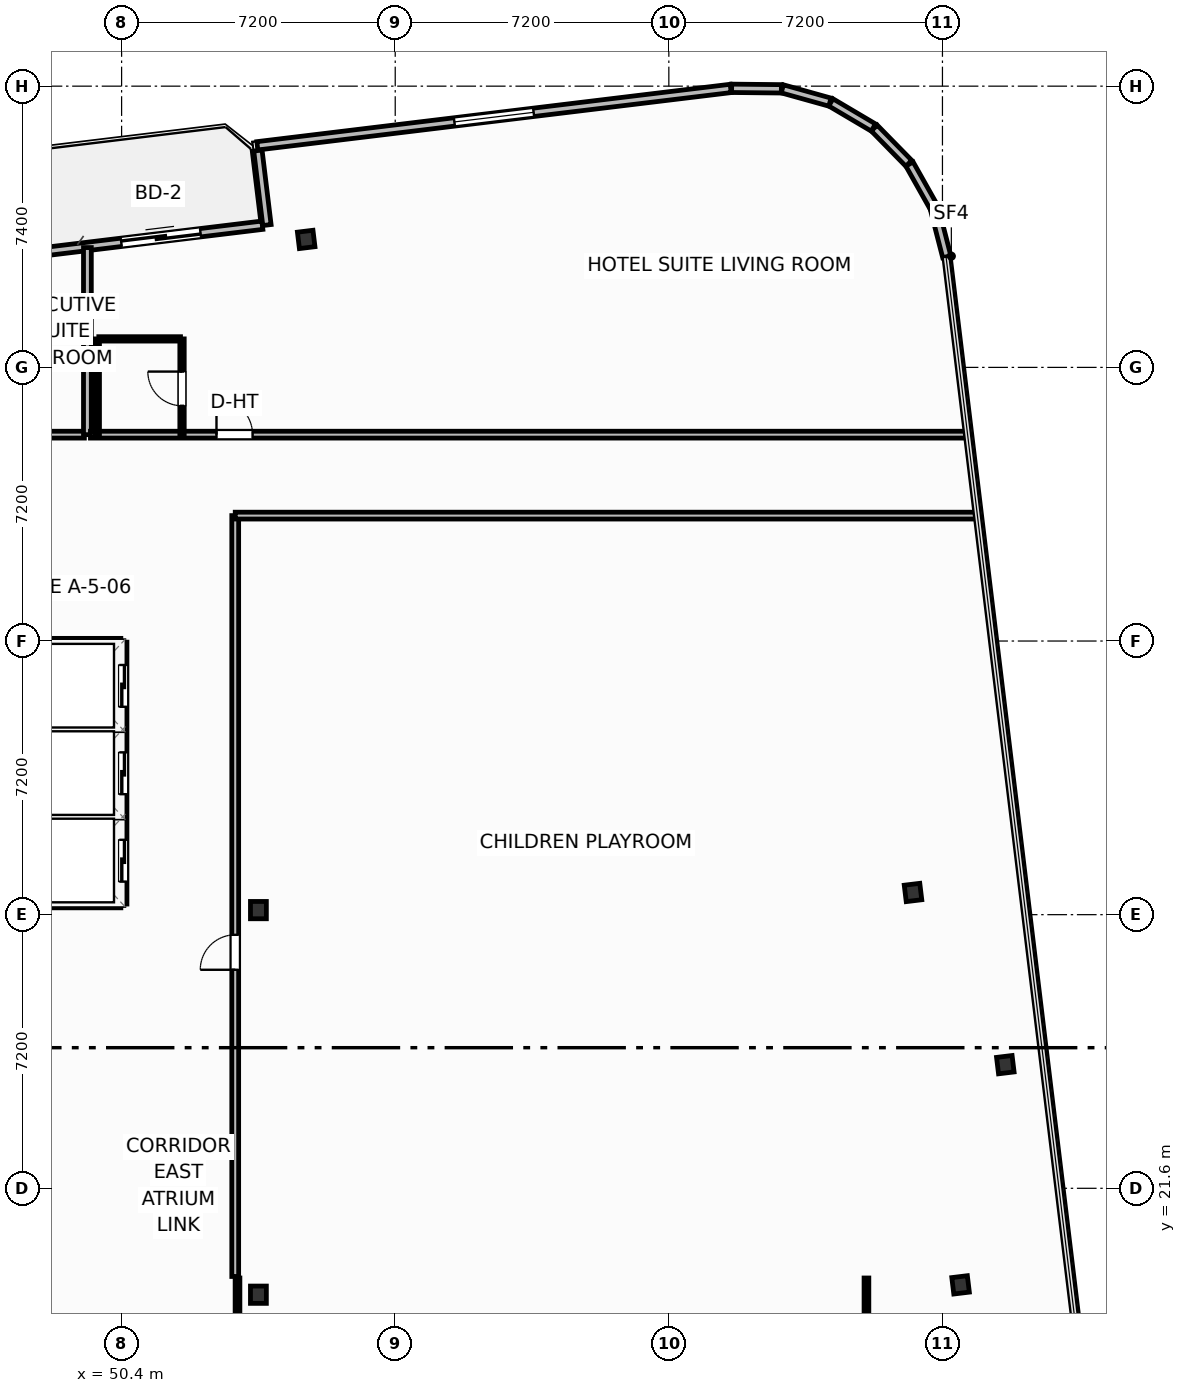
"""IFC4 building model, lengths in metres.
Left out: names, types, materials, properties, quantities, classifications, styles, units other than length and angle.
Written with IfcOpenShell. Run it as: python <this file> out.ifc"""

import sys

from ifc_helpers import new_model, si_unit, direction, frame, frame_2d, origin, origin_2d, place, context, subcontext, project, spatial, rectangle, i_section, extrude, element, fill, save


model = new_model("IFC4")
c1 = context("Model", 3, precision=1e-05, world=origin(), true_north=direction((0.0, 1.0)))
c2 = subcontext(c1, "Body", "Model", "MODEL_VIEW")
j1 = project(units=[si_unit("LENGTHUNIT", "METRE"), si_unit("PLANEANGLEUNIT", "RADIAN")], contexts=[c1])
p1 = place(None, origin())
s1 = spatial("IfcSite", under=j1, at=p1, CompositionType="ELEMENT")
p2 = place(p1, origin())
s2 = spatial("IfcBuilding", under=s1, at=p2, CompositionType="ELEMENT")
p3 = place(p2, frame((0.0, 0.0, 178.3)))
s3 = spatial("IfcBuildingStorey", under=s2, at=p3, CompositionType="ELEMENT", Elevation=178.3)
for number, where, z_axis, x_axis in (
    (1, (54.0, 18.8, 0.0), (0.0, 0.0, 1.0), (1.0, 0.0, 0.0)),
    (2, (54.0, 28.92, 0.0), (0.0, 0.0, 1.0), (1.0, 0.0, 0.0)),
):
    element("IfcColumn", number, at=place(p3, frame(where, z_axis=z_axis, x_axis=x_axis)), inside=s3, PredefinedType="COLUMN", context=c2, shape_type="SweptSolid", body=[
        extrude(i_section(OverallWidth=0.418, OverallDepth=0.455, WebThickness=0.042, FlangeThickness=0.068, FilletRadius=0.025, at=origin_2d()), origin(), (0.0, 0.0, 1.0), 3.7),
    ])
for number, where, z_axis, x_axis in (
    (3, (72.477, 19.059, 0.0), (0.0, 0.0, 1.0), (0.993, 0.12, 0.0)),
    (4, (73.654, 24.853, 0.0), (0.0, 0.0, 1.0), (0.993, 0.12, 0.0)),
    (5, (71.225, 29.384, 0.0), (0.0, 0.0, 1.0), (0.993, 0.12, 0.0)),
    (6, (55.257, 46.567, 0.0), (0.0, 0.0, 1.0), (0.993, 0.12, 0.0)),
):
    element("IfcColumn", number, at=place(p3, frame(where, z_axis=z_axis, x_axis=x_axis)), inside=s3, PredefinedType="COLUMN", context=c2, shape_type="SweptSolid", body=[
        extrude(i_section(OverallWidth=0.412, OverallDepth=0.435, WebThickness=0.036, FlangeThickness=0.057, FilletRadius=0.025, at=origin_2d()), origin(), (0.0, 0.0, 1.0), 3.7),
    ])
p4 = place(p3, frame((48.148, 46.219, 0.0), z_axis=(0.0, 0.0, 1.0), x_axis=(0.992729951822, 0.120362962556, 0.0)))
e7 = element("IfcWall", 7, at=p4, inside=s3, PredefinedType="SOLIDWALL", context=c2, shape_type="SweptSolid", body=[
    extrude(rectangle(XDim=6.0, YDim=0.22, at=frame_2d((3.0, 0.0))), origin(), (0.0, 0.0, 1.0), 2.73),
])
p5 = place(p4, frame((2.26, 0.0, 0.0)))
e8 = element("IfcOpeningElement", 8, at=p5, cuts=e7, PredefinedType="OPENING", context=c2, shape_type="SweptSolid", body=[
    extrude(rectangle(XDim=2.1, YDim=2.3, at=frame_2d((1.05, 1.15))), frame((0.0, 0.12, 0.0), z_axis=(0.0, -1.0, 0.0), x_axis=(1.0, 0.0, 0.0)), (0.0, 0.0, 1.0), 0.24),
])
p6 = place(p3, frame((72.114, 46.112, 0.0), z_axis=(0.0, 0.0, 1.0), x_axis=(-0.248942347653, 0.968518305219, 0.0)))
e9 = element("IfcWall", 9, at=p6, inside=s3, PredefinedType="SOLIDWALL", context=c2, shape_type="SweptSolid", body=[
    extrude(rectangle(XDim=1.326, YDim=0.22, at=frame_2d((0.663, 0.0))), origin(), (0.0, 0.0, 1.0), 2.73),
])
p7 = place(p3, frame((71.771, 47.418, 0.0), z_axis=(0.0, 0.0, 1.0), x_axis=(-0.491098509465, 0.871104043155, 0.0)))
e10 = element("IfcWall", 10, at=p7, inside=s3, PredefinedType="SOLIDWALL", context=c2, shape_type="SweptSolid", body=[
    extrude(rectangle(XDim=1.301, YDim=0.22, at=frame_2d((0.65, 0.0))), origin(), (0.0, 0.0, 1.0), 2.73),
])
p8 = place(p3, frame((71.115, 48.569, 0.0), z_axis=(0.0, 0.0, 1.0), x_axis=(-0.699844331926, 0.714295394827, 0.0)))
e11 = element("IfcWall", 11, at=p8, inside=s3, PredefinedType="SOLIDWALL", context=c2, shape_type="SweptSolid", body=[
    extrude(rectangle(XDim=1.301, YDim=0.22, at=frame_2d((0.65, 0.0))), origin(), (0.0, 0.0, 1.0), 2.73),
])
p9 = place(p3, frame((70.183, 49.511, 0.0), z_axis=(0.0, 0.0, 1.0), x_axis=(-0.860933999601, 0.508716668029, 0.0)))
e12 = element("IfcWall", 12, at=p9, inside=s3, PredefinedType="SOLIDWALL", context=c2, shape_type="SweptSolid", body=[
    extrude(rectangle(XDim=1.301, YDim=0.22, at=frame_2d((0.65, 0.0))), origin(), (0.0, 0.0, 1.0), 2.73),
])
p10 = place(p3, frame((69.039, 50.18, 0.0), z_axis=(0.0, 0.0, 1.0), x_axis=(-0.963205341366, 0.26876657226, 0.0)))
e13 = element("IfcWall", 13, at=p10, inside=s3, PredefinedType="SOLIDWALL", context=c2, shape_type="SweptSolid", body=[
    extrude(rectangle(XDim=1.301, YDim=0.22, at=frame_2d((0.65, 0.0))), origin(), (0.0, 0.0, 1.0), 2.73),
])
p11 = place(p3, frame((67.761, 50.53, 0.0), z_axis=(0.0, 0.0, 1.0), x_axis=(-0.999947358106, 0.010260653861, 0.0)))
e14 = element("IfcWall", 14, at=p11, inside=s3, PredefinedType="SOLIDWALL", context=c2, shape_type="SweptSolid", body=[
    extrude(rectangle(XDim=1.309, YDim=0.22, at=frame_2d((0.654, 0.0))), origin(), (0.0, 0.0, 1.0), 2.73),
])
p12 = place(p3, frame((66.427, 50.54, 0.0), z_axis=(0.0, 0.0, 1.0), x_axis=(-0.992731739233, -0.120348219431, 0.0)))
e15 = element("IfcWall", 15, at=p12, inside=s3, PredefinedType="SOLIDWALL", context=c2, shape_type="SweptSolid", body=[
    extrude(rectangle(XDim=12.547, YDim=0.22, at=frame_2d((6.273, 0.0))), origin(), (0.0, 0.0, 1.0), 2.73),
])
p13 = place(p12, frame((5.224, 0.0, 0.8)))
e16 = element("IfcOpeningElement", 16, at=p13, cuts=e15, PredefinedType="OPENING", context=c2, shape_type="SweptSolid", body=[
    extrude(rectangle(XDim=2.1, YDim=1.75, at=frame_2d((1.05, 0.875))), frame((0.0, 0.12, 0.0), z_axis=(0.0, -1.0, 0.0), x_axis=(1.0, 0.0, 0.0)), (0.0, 0.0, 1.0), 0.24),
])
p14 = place(p3, frame((53.987, 48.906, 0.0), z_axis=(0.0, 0.0, 1.0), x_axis=(0.120397815541, -0.992725725472, 0.0)))
e17 = element("IfcWall", 17, at=p14, inside=s3, PredefinedType="SOLIDWALL", context=c2, shape_type="SweptSolid", body=[
    extrude(rectangle(XDim=1.975, YDim=0.22, at=frame_2d((0.988, 0.0))), origin(), (0.0, 0.0, 1.0), 2.73),
])
p15 = place(p3, frame((53.45, 16.61, 0.0), z_axis=(0.0, 0.0, 1.0), x_axis=(0.0, 1.0, 0.0)))
e18 = element("IfcWall", 18, at=p15, inside=s3, PredefinedType="PARTITIONING", context=c2, shape_type="SweptSolid", body=[
    extrude(rectangle(XDim=2.63, YDim=0.125, at=frame_2d((1.315, 0.0))), origin(), (0.0, 0.0, 1.0), 2.662),
])
p16 = place(p3, frame((70.0, 16.61, 0.0), z_axis=(0.0, 0.0, 1.0), x_axis=(0.0, 1.0, 0.0)))
e19 = element("IfcWall", 19, at=p16, inside=s3, PredefinedType="PARTITIONING", context=c2, shape_type="SweptSolid", body=[
    extrude(rectangle(XDim=2.63, YDim=0.125, at=frame_2d((1.315, 0.0))), origin(), (0.0, 0.0, 1.0), 3.45),
])
p17 = place(p3, frame((40.58, 41.43, 0.0), z_axis=(0.0, 0.0, 1.0), x_axis=(1.0, 0.0, 0.0)))
e20 = element("IfcWall", 20, at=p17, inside=s3, PredefinedType="PARTITIONING", context=c2, shape_type="SweptSolid", body=[
    extrude(rectangle(XDim=8.84, YDim=0.18, at=frame_2d((4.42, 0.0))), origin(), (0.0, 0.0, 1.0), 3.45),
])
p18 = place(p17, frame((3.23, 0.0, 0.0)))
e21 = element("IfcOpeningElement", 21, at=p18, cuts=e20, PredefinedType="OPENING", context=c2, shape_type="SweptSolid", body=[
    extrude(rectangle(XDim=0.95, YDim=2.15, at=frame_2d((0.475, 1.075))), frame((0.0, 0.1, 0.0), z_axis=(0.0, -1.0, 0.0), x_axis=(1.0, 0.0, 0.0)), (0.0, 0.0, 1.0), 0.2),
])
p19 = place(p3, frame((49.5, 41.43, 0.0), z_axis=(0.0, 0.0, 1.0), x_axis=(0.0, 1.0, 0.0)))
e22 = element("IfcWall", 22, at=p19, inside=s3, PredefinedType="PARTITIONING", context=c2, shape_type="SweptSolid", body=[
    extrude(rectangle(XDim=4.923, YDim=0.205, at=frame_2d((2.461, 0.0))), origin(), (0.0, 0.0, 1.0), 3.45),
])
p20 = place(p3, frame((49.58, 41.43, 0.0), z_axis=(0.0, 0.0, 1.0), x_axis=(1.0, 0.0, 0.0)))
e23 = element("IfcWall", 23, at=p20, inside=s3, PredefinedType="PARTITIONING", context=c2, shape_type="SweptSolid", body=[
    extrude(rectangle(XDim=23.042, YDim=0.18, at=frame_2d((11.521, 0.0))), origin(), (0.0, 0.0, 1.0), 3.45),
])
p21 = place(p20, frame((3.317, 0.0, 0.0)))
e24 = element("IfcOpeningElement", 24, at=p21, cuts=e23, PredefinedType="OPENING", context=c2, shape_type="SweptSolid", body=[
    extrude(rectangle(XDim=0.95, YDim=2.15, at=frame_2d((0.475, 1.075))), frame((0.0, 0.1, 0.0), z_axis=(0.0, -1.0, 0.0), x_axis=(1.0, 0.0, 0.0)), (0.0, 0.0, 1.0), 0.2),
])
p22 = place(p3, frame((49.8, 43.95, 0.0), z_axis=(0.0, 0.0, 1.0), x_axis=(1.0, 0.0, 0.0)))
e25 = element("IfcWall", 25, at=p22, inside=s3, PredefinedType="PARTITIONING", context=c2, shape_type="SweptSolid", body=[
    extrude(rectangle(XDim=2.15, YDim=0.115, at=frame_2d((1.075, 0.0))), origin(), (0.0, 0.0, 1.0), 3.45),
])
p23 = place(p3, frame((51.99, 41.43, 0.0), z_axis=(0.0, 0.0, 1.0), x_axis=(0.0, 1.0, 0.0)))
e26 = element("IfcWall", 26, at=p23, inside=s3, PredefinedType="PARTITIONING", context=c2, shape_type="SweptSolid", body=[
    extrude(rectangle(XDim=2.52, YDim=0.115, at=frame_2d((1.26, 0.0))), origin(), (0.0, 0.0, 1.0), 3.45),
])
p24 = place(p23, frame((0.76, 0.0, 0.0)))
e27 = element("IfcOpeningElement", 27, at=p24, cuts=e26, PredefinedType="OPENING", context=c2, shape_type="SweptSolid", body=[
    extrude(rectangle(XDim=0.9, YDim=2.05, at=frame_2d((0.45, 1.025))), frame((0.0, 0.067, 0.0), z_axis=(0.0, -1.0, 0.0), x_axis=(1.0, 0.0, 0.0)), (0.0, 0.0, 1.0), 0.135),
])
p25 = place(p3, frame((49.76, 41.43, 0.0), z_axis=(0.0, 0.0, 1.0), x_axis=(0.0, 1.0, 0.0)))
e28 = element("IfcWall", 28, at=p25, inside=s3, PredefinedType="PARTITIONING", context=c2, shape_type="SweptSolid", body=[
    extrude(rectangle(XDim=2.52, YDim=0.115, at=frame_2d((1.26, 0.0))), origin(), (0.0, 0.0, 1.0), 3.45),
])
p26 = place(p3, frame((53.39, 19.28, 0.0), z_axis=(0.0, 0.0, 1.0), x_axis=(0.0, 1.0, 0.0)))
e29 = element("IfcWall", 29, at=p26, inside=s3, PredefinedType="PARTITIONING", context=c2, shape_type="SweptSolid", body=[
    extrude(rectangle(XDim=20.02, YDim=0.18, at=frame_2d((10.01, 0.0))), origin(), (0.0, 0.0, 1.0), 3.45),
])
p27 = place(p26, frame((8.07, 0.0, 0.0)))
e30 = element("IfcOpeningElement", 30, at=p27, cuts=e29, PredefinedType="OPENING", context=c2, shape_type="SweptSolid", body=[
    extrude(rectangle(XDim=0.92, YDim=2.05, at=frame_2d((0.46, 1.025))), frame((0.0, 0.1, 0.0), z_axis=(0.0, -1.0, 0.0), x_axis=(1.0, 0.0, 0.0)), (0.0, 0.0, 1.0), 0.2),
])
p28 = place(p3, frame((53.39, 39.3, 0.0), z_axis=(0.0, 0.0, 1.0), x_axis=(1.0, 0.0, 0.0)))
e31 = element("IfcWall", 31, at=p28, inside=s3, PredefinedType="PARTITIONING", context=c2, shape_type="SweptSolid", body=[
    extrude(rectangle(XDim=19.49, YDim=0.18, at=frame_2d((9.745, 0.0))), origin(), (0.0, 0.0, 1.0), 3.45),
])
for number, where, z_axis, x_axis in (
    (32, (48.32, 31.375, 0.0), (0.0, 0.0, 1.0), (1.0, 0.0, 0.0)),
    (33, (48.32, 33.675, 0.0), (0.0, 0.0, 1.0), (1.0, 0.0, 0.0)),
):
    element("IfcWall", number, at=place(p3, frame(where, z_axis=z_axis, x_axis=x_axis)), inside=s3, PredefinedType="PARTITIONING", context=c2, shape_type="SweptSolid", body=[
        extrude(rectangle(XDim=2.06, YDim=0.2, at=frame_2d((1.03, 0.0))), origin(), (0.0, 0.0, 1.0), 3.45),
    ])
p29 = place(p3, frame((48.32, 29.08, 0.0), z_axis=(0.0, 0.0, 1.0), x_axis=(1.0, 0.0, 0.0)))
e34 = element("IfcWall", 34, at=p29, inside=s3, PredefinedType="PARTITIONING", context=c2, shape_type="SweptSolid", body=[
    extrude(rectangle(XDim=2.06, YDim=0.2, at=frame_2d((1.03, 0.0))), origin(), (0.0, 0.0, 1.0), 2.662),
])
p30 = place(p3, frame((48.32, 35.97, 0.0), z_axis=(0.0, 0.0, 1.0), x_axis=(1.0, 0.0, 0.0)))
e35 = element("IfcWall", 35, at=p30, inside=s3, PredefinedType="PARTITIONING", context=c2, shape_type="SweptSolid", body=[
    extrude(rectangle(XDim=2.06, YDim=0.2, at=frame_2d((1.03, 0.0))), origin(), (0.0, 0.0, 1.0), 3.45),
])
p31 = place(p3, frame((50.44, 29.08, 0.0), z_axis=(0.0, 0.0, 1.0), x_axis=(0.0, 1.0, 0.0)))
e36 = element("IfcWall", 36, at=p31, inside=s3, PredefinedType="PARTITIONING", context=c2, shape_type="SweptSolid", body=[
    extrude(rectangle(XDim=6.89, YDim=0.2, at=frame_2d((3.445, 0.0))), origin(), (0.0, 0.0, 1.0), 3.45),
])
p32 = place(p31, frame((0.59, 0.0, 0.0)))
e37 = element("IfcOpeningElement", 37, at=p32, cuts=e36, PredefinedType="OPENING", context=c2, shape_type="SweptSolid", body=[
    extrude(rectangle(XDim=1.1, YDim=2.15, at=frame_2d((0.55, 1.075))), frame((0.0, 0.11, 0.0), z_axis=(0.0, -1.0, 0.0), x_axis=(1.0, 0.0, 0.0)), (0.0, 0.0, 1.0), 0.22),
])
p33 = place(p31, frame((2.89, 0.0, 0.0)))
e38 = element("IfcOpeningElement", 38, at=p33, cuts=e36, PredefinedType="OPENING", context=c2, shape_type="SweptSolid", body=[
    extrude(rectangle(XDim=1.1, YDim=2.15, at=frame_2d((0.55, 1.075))), frame((0.0, 0.11, 0.0), z_axis=(0.0, -1.0, 0.0), x_axis=(1.0, 0.0, 0.0)), (0.0, 0.0, 1.0), 0.22),
])
p34 = place(p31, frame((5.19, 0.0, 0.0)))
e39 = element("IfcOpeningElement", 39, at=p34, cuts=e36, PredefinedType="OPENING", context=c2, shape_type="SweptSolid", body=[
    extrude(rectangle(XDim=1.1, YDim=2.15, at=frame_2d((0.55, 1.075))), frame((0.0, 0.11, 0.0), z_axis=(0.0, -1.0, 0.0), x_axis=(1.0, 0.0, 0.0)), (0.0, 0.0, 1.0), 0.22),
])
p35 = place(p5, origin())
e40 = element("IfcDoor", 40, at=p35, inside=s3, OperationType="SLIDING_TO_LEFT", PredefinedType="DOOR", context=c2, shape_type="SweptSolid", body=[
    extrude(rectangle(XDim=2.1, YDim=2.3, at=frame_2d((1.05, 1.15))), frame((0.0, 0.025, 0.0), z_axis=(0.0, -1.0, 0.0), x_axis=(1.0, 0.0, 0.0)), (0.0, 0.0, 1.0), 0.05),
])
fill(e8, e40)
p36 = place(p13, origin())
e41 = element("IfcWindow", 41, at=p36, inside=s3, PartitioningType="SINGLE_PANEL", PredefinedType="WINDOW", context=c2, shape_type="SweptSolid", body=[
    extrude(rectangle(XDim=2.1, YDim=1.75, at=frame_2d((1.05, 0.875))), frame((0.0, 0.03, 0.0), z_axis=(0.0, -1.0, 0.0), x_axis=(1.0, 0.0, 0.0)), (0.0, 0.0, 1.0), 0.06),
])
fill(e16, e41)
p37 = place(p21, origin())
e42 = element("IfcDoor", 42, at=p37, inside=s3, OperationType="SINGLE_SWING_LEFT", PredefinedType="DOOR", context=c2, shape_type="SweptSolid", body=[
    extrude(rectangle(XDim=0.95, YDim=2.15, at=frame_2d((0.475, 1.075))), frame((0.0, 0.025, 0.0), z_axis=(0.0, -1.0, 0.0), x_axis=(1.0, 0.0, 0.0)), (0.0, 0.0, 1.0), 0.05),
])
fill(e24, e42)
p38 = place(p24, origin())
e43 = element("IfcDoor", 43, at=p38, inside=s3, OperationType="SINGLE_SWING_RIGHT", PredefinedType="DOOR", context=c2, shape_type="SweptSolid", body=[
    extrude(rectangle(XDim=0.9, YDim=2.05, at=frame_2d((0.45, 1.025))), frame((0.0, 0.025, 0.0), z_axis=(0.0, -1.0, 0.0), x_axis=(1.0, 0.0, 0.0)), (0.0, 0.0, 1.0), 0.05),
])
fill(e27, e43)
p39 = place(p27, origin())
e44 = element("IfcDoor", 44, at=p39, inside=s3, OperationType="SINGLE_SWING_LEFT", PredefinedType="DOOR", context=c2, shape_type="SweptSolid", body=[
    extrude(rectangle(XDim=0.92, YDim=2.05, at=frame_2d((0.46, 1.025))), frame((0.0, 0.025, 0.0), z_axis=(0.0, -1.0, 0.0), x_axis=(1.0, 0.0, 0.0)), (0.0, 0.0, 1.0), 0.05),
])
fill(e30, e44)
p40 = place(p32, origin())
e45 = element("IfcDoor", 45, at=p40, inside=s3, OperationType="SLIDING_TO_LEFT", PredefinedType="DOOR", context=c2, shape_type="SweptSolid", body=[
    extrude(rectangle(XDim=1.1, YDim=2.15, at=frame_2d((0.55, 1.075))), frame((0.0, 0.025, 0.0), z_axis=(0.0, -1.0, 0.0), x_axis=(1.0, 0.0, 0.0)), (0.0, 0.0, 1.0), 0.05),
])
fill(e37, e45)
p41 = place(p33, origin())
e46 = element("IfcDoor", 46, at=p41, inside=s3, OperationType="SLIDING_TO_LEFT", PredefinedType="DOOR", context=c2, shape_type="SweptSolid", body=[
    extrude(rectangle(XDim=1.1, YDim=2.15, at=frame_2d((0.55, 1.075))), frame((0.0, 0.025, 0.0), z_axis=(0.0, -1.0, 0.0), x_axis=(1.0, 0.0, 0.0)), (0.0, 0.0, 1.0), 0.05),
])
fill(e38, e46)
p42 = place(p34, origin())
e47 = element("IfcDoor", 47, at=p42, inside=s3, OperationType="SLIDING_TO_LEFT", PredefinedType="DOOR", context=c2, shape_type="SweptSolid", body=[
    extrude(rectangle(XDim=1.1, YDim=2.15, at=frame_2d((0.55, 1.075))), frame((0.0, 0.025, 0.0), z_axis=(0.0, -1.0, 0.0), x_axis=(1.0, 0.0, 0.0)), (0.0, 0.0, 1.0), 0.05),
])
fill(e39, e47)
save(model, sys.argv[1])
